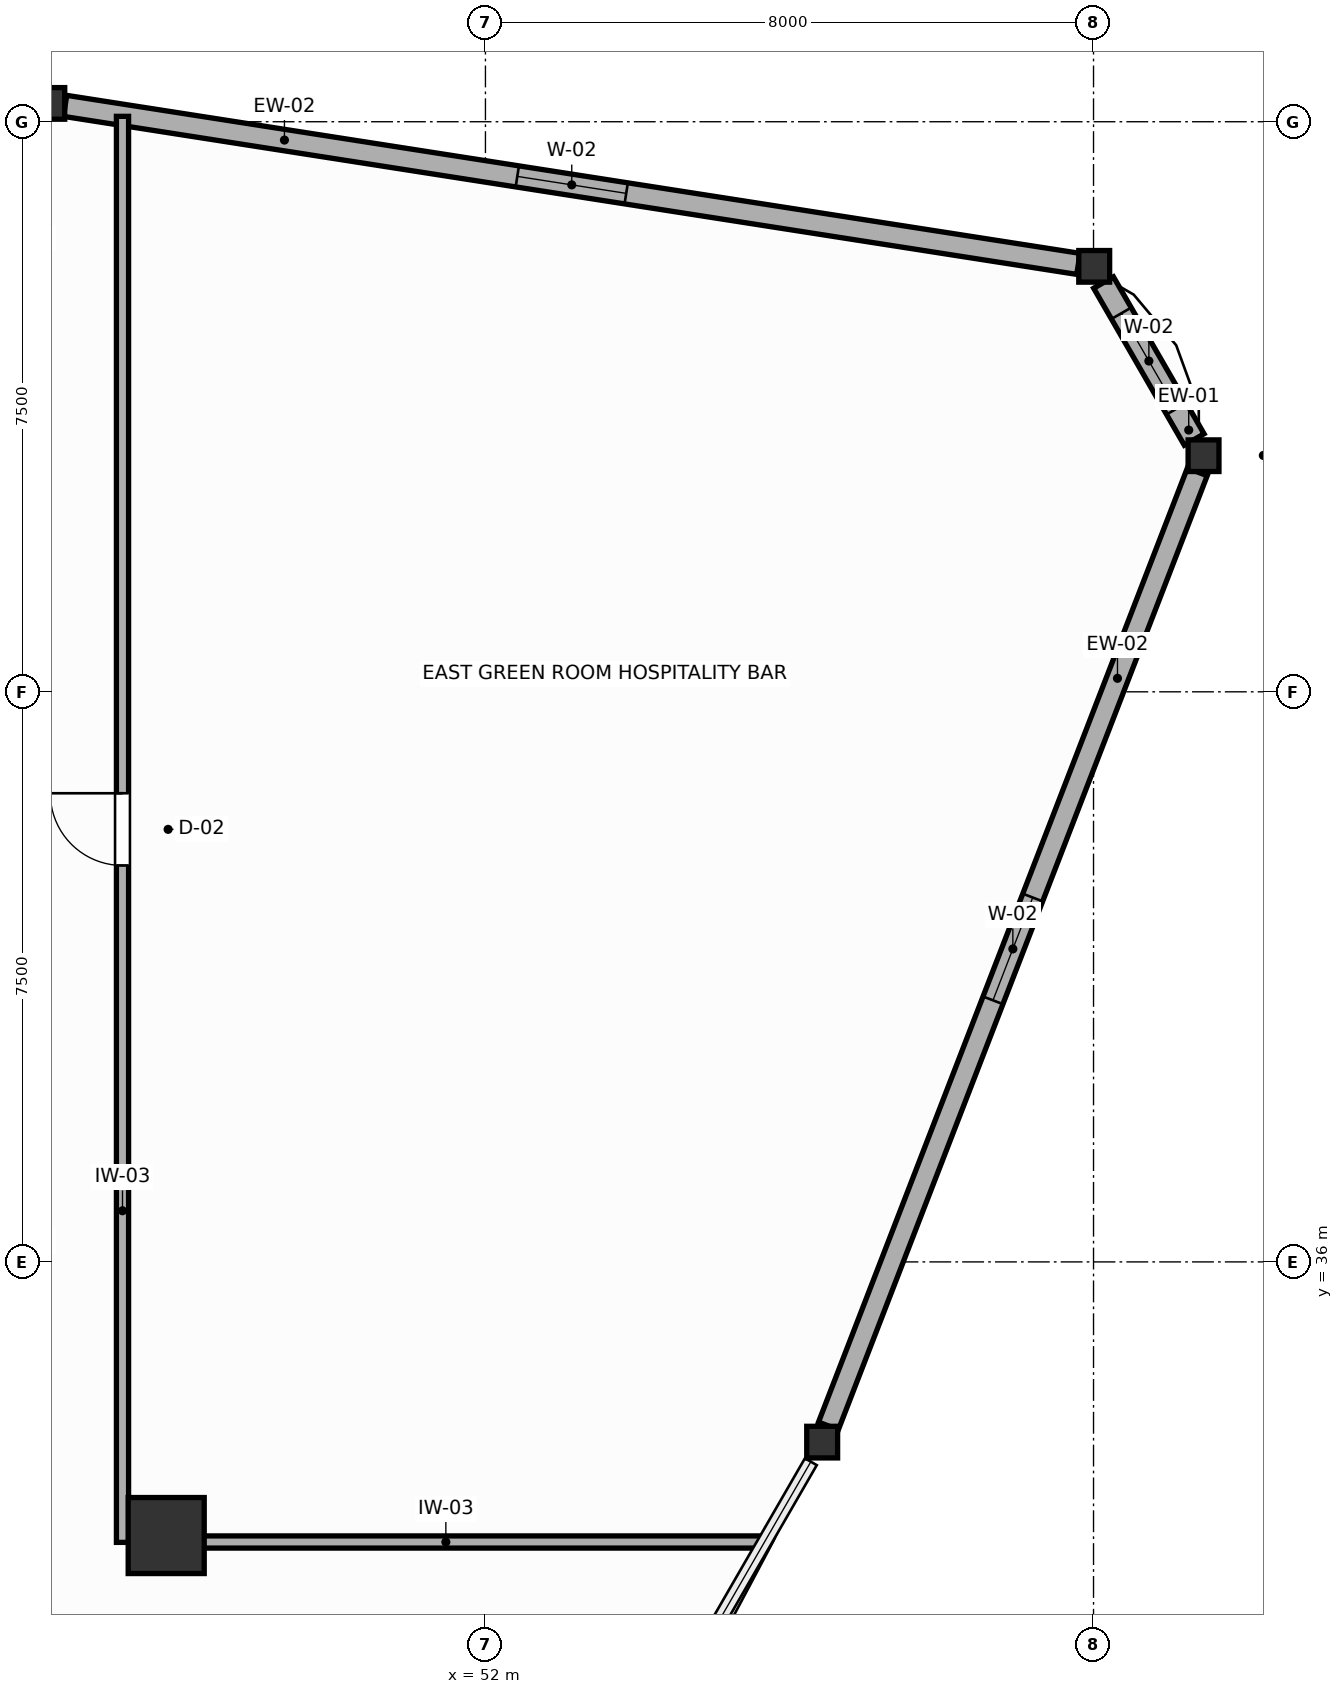
"""IFC4 building model, lengths in metres.
Left out: names, types, materials, properties, quantities, classifications, styles, units other than length and angle.
Written with IfcOpenShell. Run it as: python <this file> out.ifc"""

import sys

from ifc_helpers import new_model, si_unit, direction, frame, frame_2d, origin, origin_2d, place, context, subcontext, project, spatial, rectangle, i_section, extrude, source, transform, mapped, element, fill, save


model = new_model("IFC4")
c1 = context("Model", 3, precision=1e-05, world=origin(), true_north=direction((0.0, 1.0)))
c2 = subcontext(c1, "Body", "Model", "MODEL_VIEW")
j1 = project(units=[si_unit("LENGTHUNIT", "METRE"), si_unit("PLANEANGLEUNIT", "RADIAN")], contexts=[c1])
p1 = place(None, origin())
s1 = spatial("IfcSite", under=j1, at=p1, CompositionType="ELEMENT")
p2 = place(p1, origin())
s2 = spatial("IfcBuilding", under=s1, at=p2, CompositionType="ELEMENT")
p3 = place(p2, frame((0.0, 0.0, 231.0)))
s3 = spatial("IfcBuildingStorey", under=s2, at=p3, CompositionType="ELEMENT", Elevation=231.0)
m1 = source(origin(), c2, "Body", "SweptSolid", [
    extrude(rectangle(XDim=1.0, YDim=1.0, at=origin_2d()), origin(), (0.0, 0.0, 1.0), 3.6),
])
p4 = place(p3, frame((47.8, 32.4, 0.0), z_axis=(0.0, 0.0, 1.0), x_axis=(1.0, 0.0, 0.0)))
e1 = element("IfcColumn", 1, at=p4, inside=s3, PredefinedType="COLUMN", context=c2, shape_type="MappedRepresentation", body=[
    mapped(m1, transform((0.0, 0.0, 0.0), scale=1.0)),
])
m2 = source(origin(), c2, "Body", "SweptSolid", [
    extrude(i_section(OverallWidth=0.406, OverallDepth=0.416, WebThickness=0.027, FlangeThickness=0.044, FilletRadius=0.015, at=origin_2d()), origin(), (0.0, 0.0, 1.0), 3.6),
])
for number, where, z_axis, x_axis in (
    (2, (61.447, 46.606, 0.0), (0.0, 0.0, 1.0), (1.0, 0.0, 0.0)),
    (3, (60.009, 49.098, 0.0), (0.0, 0.0, 1.0), (1.0, 0.0, 0.0)),
    (4, (46.262, 51.241, 0.0), (0.0, 0.0, 1.0), (1.0, 0.0, 0.0)),
    (5, (56.43, 33.629, 0.0), (0.0, 0.0, 1.0), (1.0, 0.0, 0.0)),
):
    element("IfcColumn", number, at=place(p3, frame(where, z_axis=z_axis, x_axis=x_axis)), inside=s3, PredefinedType="COLUMN", context=c2, shape_type="MappedRepresentation", body=[
        mapped(m2, transform((0.0, 0.0, 0.0), scale=1.0)),
    ])
p5 = place(p3, frame((61.324, 46.819, 0.0), z_axis=(0.0, 0.0, 1.0), x_axis=(-0.499938113561, 0.866061130988, 0.0)))
e6 = element("IfcWall", 6, at=p5, inside=s3, PredefinedType="SOLIDWALL", context=c2, shape_type="SweptSolid", body=[
    extrude(rectangle(XDim=2.385, YDim=0.3, at=frame_2d((1.192, 0.0))), origin(), (0.0, 0.0, 1.0), 3.02),
])
p6 = place(p5, frame((0.467, 0.0, 0.75)))
e7 = element("IfcOpeningElement", 7, at=p6, cuts=e6, PredefinedType="OPENING", context=c2, shape_type="SweptSolid", body=[
    extrude(rectangle(XDim=1.45, YDim=1.65, at=frame_2d((0.725, 0.825))), frame((0.0, 0.16, 0.0), z_axis=(0.0, -1.0, 0.0), x_axis=(1.0, 0.0, 0.0)), (0.0, 0.0, 1.0), 0.32),
])
p7 = place(p3, frame((59.801, 49.13, 0.0), z_axis=(0.0, 0.0, 1.0), x_axis=(-0.988058992674, 0.154076042901, 0.0)))
e8 = element("IfcWall", 8, at=p7, inside=s3, PredefinedType="SOLIDWALL", context=c2, shape_type="SweptSolid", body=[
    extrude(rectangle(XDim=13.492, YDim=0.28, at=frame_2d((6.746, 0.0))), origin(), (0.0, 0.0, 1.0), 3.02),
])
p8 = place(p7, frame((6.021, 0.0, 0.75)))
e9 = element("IfcOpeningElement", 9, at=p8, cuts=e8, PredefinedType="OPENING", context=c2, shape_type="SweptSolid", body=[
    extrude(rectangle(XDim=1.45, YDim=1.65, at=frame_2d((0.725, 0.825))), frame((0.0, 0.15, 0.0), z_axis=(0.0, -1.0, 0.0), x_axis=(1.0, 0.0, 0.0)), (0.0, 0.0, 1.0), 0.3),
])
p9 = place(p3, frame((56.512, 33.842, 0.0), z_axis=(0.0, 0.0, 1.0), x_axis=(0.360605208927, 0.932718544522, 0.0)))
e10 = element("IfcWall", 10, at=p9, inside=s3, PredefinedType="SOLIDWALL", context=c2, shape_type="SweptSolid", body=[
    extrude(rectangle(XDim=13.457, YDim=0.28, at=frame_2d((6.728, 0.0))), origin(), (0.0, 0.0, 1.0), 3.02),
])
p10 = place(p9, frame((6.003, 0.0, 0.75)))
e11 = element("IfcOpeningElement", 11, at=p10, cuts=e10, PredefinedType="OPENING", context=c2, shape_type="SweptSolid", body=[
    extrude(rectangle(XDim=1.45, YDim=1.65, at=frame_2d((0.725, 0.825))), frame((0.0, 0.15, 0.0), z_axis=(0.0, -1.0, 0.0), x_axis=(1.0, 0.0, 0.0)), (0.0, 0.0, 1.0), 0.3),
])
p11 = place(p3, frame((47.225, 32.31, 0.0), z_axis=(0.0, 0.0, 1.0), x_axis=(0.0, 1.0, 0.0)))
e12 = element("IfcWall", 12, at=p11, inside=s3, PredefinedType="PARTITIONING", context=c2, shape_type="SweptSolid", body=[
    extrude(rectangle(XDim=18.761, YDim=0.16, at=frame_2d((9.38, 0.0))), origin(), (0.0, 0.0, 1.0), 3.41),
])
p12 = place(p11, frame((8.906, 0.0, 0.0)))
e13 = element("IfcOpeningElement", 13, at=p12, cuts=e12, PredefinedType="OPENING", context=c2, shape_type="SweptSolid", body=[
    extrude(rectangle(XDim=0.95, YDim=2.05, at=frame_2d((0.475, 1.025))), frame((0.0, 0.09, 0.0), z_axis=(0.0, -1.0, 0.0), x_axis=(1.0, 0.0, 0.0)), (0.0, 0.0, 1.0), 0.18),
])
p13 = place(p3, frame((47.307, 32.315, 0.0), z_axis=(0.0, 0.0, 1.0), x_axis=(1.0, 0.0, 0.0)))
e14 = element("IfcWall", 14, at=p13, inside=s3, PredefinedType="PARTITIONING", context=c2, shape_type="SweptSolid", body=[
    extrude(rectangle(XDim=8.344, YDim=0.16, at=frame_2d((4.172, 0.0))), origin(), (0.0, 0.0, 1.0), 2.96),
])
p14 = place(p6, origin())
e15 = element("IfcWindow", 15, at=p14, inside=s3, PartitioningType="SINGLE_PANEL", PredefinedType="WINDOW", context=c2, shape_type="SweptSolid", body=[
    extrude(rectangle(XDim=1.45, YDim=1.65, at=frame_2d((0.725, 0.825))), frame((0.0, 0.03, 0.0), z_axis=(0.0, -1.0, 0.0), x_axis=(1.0, 0.0, 0.0)), (0.0, 0.0, 1.0), 0.06),
])
fill(e7, e15)
p15 = place(p8, origin())
e16 = element("IfcWindow", 16, at=p15, inside=s3, PartitioningType="SINGLE_PANEL", PredefinedType="WINDOW", context=c2, shape_type="SweptSolid", body=[
    extrude(rectangle(XDim=1.45, YDim=1.65, at=frame_2d((0.725, 0.825))), frame((0.0, 0.03, 0.0), z_axis=(0.0, -1.0, 0.0), x_axis=(1.0, 0.0, 0.0)), (0.0, 0.0, 1.0), 0.06),
])
fill(e9, e16)
p16 = place(p10, origin())
e17 = element("IfcWindow", 17, at=p16, inside=s3, PartitioningType="SINGLE_PANEL", PredefinedType="WINDOW", context=c2, shape_type="SweptSolid", body=[
    extrude(rectangle(XDim=1.45, YDim=1.65, at=frame_2d((0.725, 0.825))), frame((0.0, 0.03, 0.0), z_axis=(0.0, -1.0, 0.0), x_axis=(1.0, 0.0, 0.0)), (0.0, 0.0, 1.0), 0.06),
])
fill(e11, e17)
p17 = place(p12, origin())
e18 = element("IfcDoor", 18, at=p17, inside=s3, OperationType="SINGLE_SWING_RIGHT", PredefinedType="DOOR", context=c2, shape_type="SweptSolid", body=[
    extrude(rectangle(XDim=0.95, YDim=2.05, at=frame_2d((0.475, 1.025))), frame((0.0, 0.025, 0.0), z_axis=(0.0, -1.0, 0.0), x_axis=(1.0, 0.0, 0.0)), (0.0, 0.0, 1.0), 0.05),
])
fill(e13, e18)
save(model, sys.argv[1])
